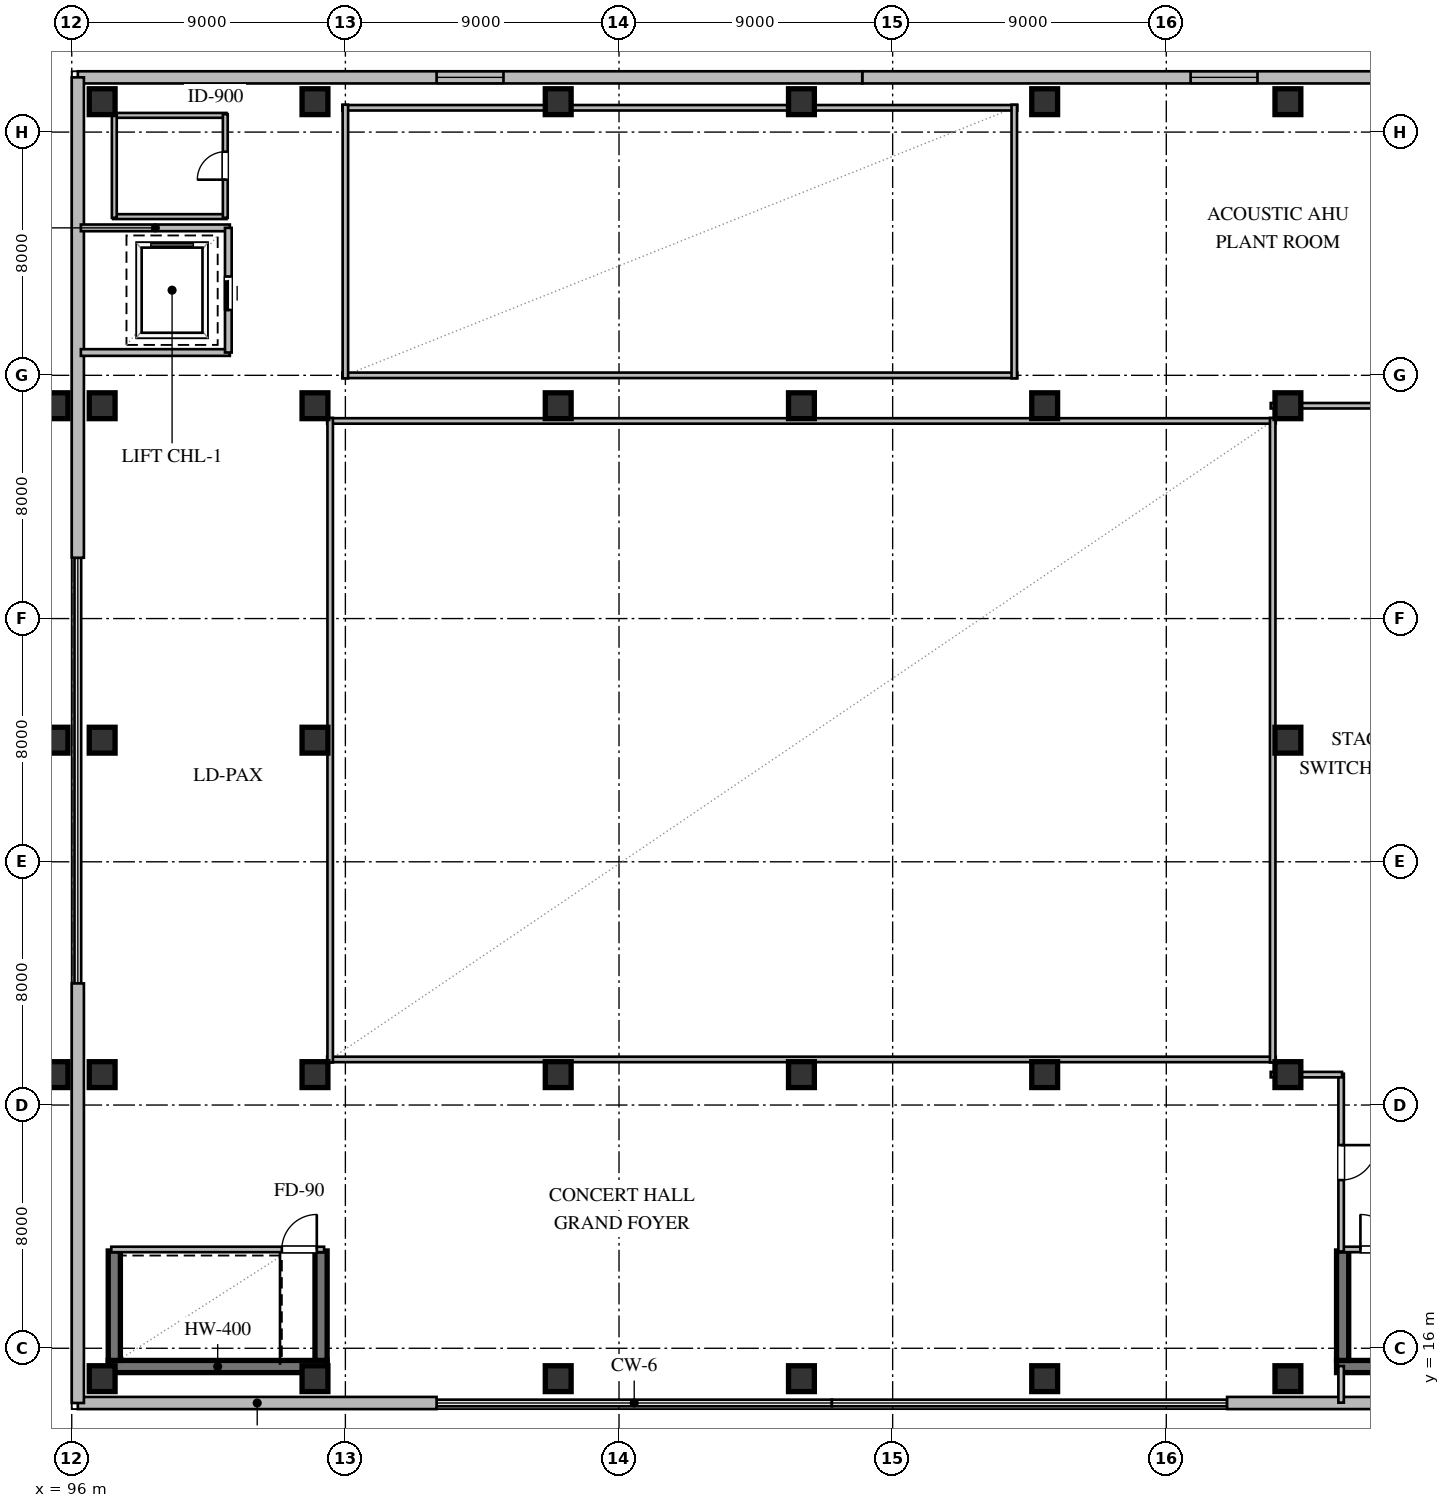
"""IFC4 building model, lengths in metres.
Left out: names, types, materials, properties, quantities, classifications, styles, units other than length and angle.
Written with IfcOpenShell. Run it as: python <this file> out.ifc"""

import sys

from ifc_helpers import new_model, si_unit, direction, frame, frame_2d, origin, origin_2d, place, context, subcontext, project, spatial, rectangle, extrude, element, fill, save


model = new_model("IFC4")
c1 = context("Model", 3, precision=1e-05, world=origin(), true_north=direction((0.0, 1.0)))
c2 = subcontext(c1, "Body", "Model", "MODEL_VIEW")
j1 = project(units=[si_unit("LENGTHUNIT", "METRE"), si_unit("PLANEANGLEUNIT", "RADIAN")], contexts=[c1])
p1 = place(None, origin())
s1 = spatial("IfcSite", under=j1, at=p1, CompositionType="ELEMENT")
p2 = place(p1, origin())
s2 = spatial("IfcBuilding", under=s1, at=p2, CompositionType="ELEMENT")
p3 = place(p2, frame((0.0, 0.0, 14.4)))
s3 = spatial("IfcBuildingStorey", under=s2, at=p3, CompositionType="ELEMENT", Elevation=14.4)
for number, where, z_axis, x_axis in (
    (1, (97.0, 15.0, 0.0), (0.0, 0.0, 1.0), (1.0, 0.0, 0.0)),
    (2, (97.0, 25.0, 0.0), (0.0, 0.0, 1.0), (1.0, 0.0, 0.0)),
    (3, (97.0, 36.0, 0.0), (0.0, 0.0, 1.0), (1.0, 0.0, 0.0)),
    (4, (97.0, 47.0, 0.0), (0.0, 0.0, 1.0), (1.0, 0.0, 0.0)),
    (5, (97.0, 57.0, 0.0), (0.0, 0.0, 1.0), (1.0, 0.0, 0.0)),
    (6, (104.0, 15.0, 0.0), (0.0, 0.0, 1.0), (1.0, 0.0, 0.0)),
    (7, (104.0, 25.0, 0.0), (0.0, 0.0, 1.0), (1.0, 0.0, 0.0)),
    (8, (104.0, 36.0, 0.0), (0.0, 0.0, 1.0), (1.0, 0.0, 0.0)),
    (9, (104.0, 47.0, 0.0), (0.0, 0.0, 1.0), (1.0, 0.0, 0.0)),
    (10, (104.0, 57.0, 0.0), (0.0, 0.0, 1.0), (1.0, 0.0, 0.0)),
    (11, (112.0, 15.0, 0.0), (0.0, 0.0, 1.0), (1.0, 0.0, 0.0)),
    (12, (112.0, 25.0, 0.0), (0.0, 0.0, 1.0), (1.0, 0.0, 0.0)),
    (13, (112.0, 47.0, 0.0), (0.0, 0.0, 1.0), (1.0, 0.0, 0.0)),
    (14, (112.0, 57.0, 0.0), (0.0, 0.0, 1.0), (1.0, 0.0, 0.0)),
    (15, (120.0, 15.0, 0.0), (0.0, 0.0, 1.0), (1.0, 0.0, 0.0)),
    (16, (120.0, 25.0, 0.0), (0.0, 0.0, 1.0), (1.0, 0.0, 0.0)),
    (17, (120.0, 47.0, 0.0), (0.0, 0.0, 1.0), (1.0, 0.0, 0.0)),
    (18, (120.0, 57.0, 0.0), (0.0, 0.0, 1.0), (1.0, 0.0, 0.0)),
    (19, (128.0, 15.0, 0.0), (0.0, 0.0, 1.0), (1.0, 0.0, 0.0)),
    (20, (128.0, 25.0, 0.0), (0.0, 0.0, 1.0), (1.0, 0.0, 0.0)),
    (21, (128.0, 47.0, 0.0), (0.0, 0.0, 1.0), (1.0, 0.0, 0.0)),
    (22, (128.0, 57.0, 0.0), (0.0, 0.0, 1.0), (1.0, 0.0, 0.0)),
    (23, (136.0, 15.0, 0.0), (0.0, 0.0, 1.0), (1.0, 0.0, 0.0)),
    (24, (136.0, 25.0, 0.0), (0.0, 0.0, 1.0), (1.0, 0.0, 0.0)),
    (25, (136.0, 36.0, 0.0), (0.0, 0.0, 1.0), (1.0, 0.0, 0.0)),
    (26, (136.0, 47.0, 0.0), (0.0, 0.0, 1.0), (1.0, 0.0, 0.0)),
    (27, (136.0, 57.0, 0.0), (0.0, 0.0, 1.0), (1.0, 0.0, 0.0)),
):
    element("IfcColumn", number, at=place(p3, frame(where, z_axis=z_axis, x_axis=x_axis)), inside=s3, PredefinedType="COLUMN", context=c2, shape_type="SweptSolid", body=[
        extrude(rectangle(XDim=0.85, YDim=0.85, at=origin_2d()), origin(), (0.0, 0.0, 1.0), 4.8),
    ])
p4 = place(p3, frame((97.2, 15.4, 0.0), z_axis=(0.0, 0.0, 1.0), x_axis=(1.0, 0.0, 0.0)))
e28 = element("IfcWall", 28, at=p4, inside=s3, PredefinedType="SHEAR", context=c2, shape_type="SweptSolid", body=[
    extrude(rectangle(XDim=7.2, YDim=0.4, at=frame_2d((3.6, 0.0))), origin(), (0.0, 0.0, 1.0), 4.52),
])
for number, where, z_axis, x_axis in (
    (29, (97.4, 15.6, 0.0), (0.0, 0.0, 1.0), (0.0, 1.0, 0.0)),
    (30, (104.2, 15.6, 0.0), (0.0, 0.0, 1.0), (0.0, 1.0, 0.0)),
):
    element("IfcWall", number, at=place(p3, frame(where, z_axis=z_axis, x_axis=x_axis)), inside=s3, PredefinedType="SHEAR", context=c2, shape_type="SweptSolid", body=[
        extrude(rectangle(XDim=3.6, YDim=0.4, at=frame_2d((1.8, 0.0))), origin(), (0.0, 0.0, 1.0), 4.52),
    ])
p5 = place(p3, frame((137.6, 15.4, 0.0), z_axis=(0.0, 0.0, 1.0), x_axis=(1.0, 0.0, 0.0)))
e31 = element("IfcWall", 31, at=p5, inside=s3, PredefinedType="SHEAR", context=c2, shape_type="SweptSolid", body=[
    extrude(rectangle(XDim=7.2, YDim=0.4, at=frame_2d((3.6, 0.0))), origin(), (0.0, 0.0, 1.0), 4.52),
])
p6 = place(p3, frame((137.8, 15.6, 0.0), z_axis=(0.0, 0.0, 1.0), x_axis=(0.0, 1.0, 0.0)))
e32 = element("IfcWall", 32, at=p6, inside=s3, PredefinedType="SHEAR", context=c2, shape_type="SweptSolid", body=[
    extrude(rectangle(XDim=3.6, YDim=0.4, at=frame_2d((1.8, 0.0))), origin(), (0.0, 0.0, 1.0), 4.52),
])
for number, where, z_axis, x_axis in (
    (33, (95.45, 25.0, 0.0), (0.0, 0.0, 1.0), (1.0, 0.0, 0.0)),
    (34, (95.45, 36.0, 0.0), (0.0, 0.0, 1.0), (1.0, 0.0, 0.0)),
    (35, (95.45, 47.0, 0.0), (0.0, 0.0, 1.0), (1.0, 0.0, 0.0)),
):
    element("IfcColumn", number, at=place(p3, frame(where, z_axis=z_axis, x_axis=x_axis)), inside=s3, PredefinedType="COLUMN", context=c2, shape_type="SweptSolid", body=[
        extrude(rectangle(XDim=0.85, YDim=0.85, at=origin_2d()), origin(), (0.0, 0.0, 1.0), 4.31),
    ])
for number, where, z_axis, x_axis in (
    (36, (96.2, 14.2, 0.0), (0.0, 0.0, 1.0), (1.0, 0.0, 0.0)),
    (37, (134.0, 14.2, 0.0), (0.0, 0.0, 1.0), (1.0, 0.0, 0.0)),
):
    element("IfcWall", number, at=place(p3, frame(where, z_axis=z_axis, x_axis=x_axis)), inside=s3, PredefinedType="STANDARD", context=c2, shape_type="SweptSolid", body=[
        extrude(rectangle(XDim=11.8, YDim=0.4, at=frame_2d((5.9, 0.0))), origin(), (0.0, 0.0, 1.0), 4.52),
    ])
p7 = place(p3, frame((145.8, 57.8, 0.0), z_axis=(0.0, 0.0, 1.0), x_axis=(-1.0, 0.0, 0.0)))
e38 = element("IfcWall", 38, at=p7, inside=s3, PredefinedType="STANDARD", context=c2, shape_type="SweptSolid", body=[
    extrude(rectangle(XDim=23.8, YDim=0.4, at=frame_2d((11.9, 0.0))), origin(), (0.0, 0.0, 1.0), 4.52),
])
p8 = place(p7, frame((10.8, 0.0, 1.25)))
e39 = element("IfcOpeningElement", 39, at=p8, cuts=e38, PredefinedType="OPENING", context=c2, shape_type="SweptSolid", body=[
    extrude(rectangle(XDim=2.2, YDim=1.5, at=frame_2d((1.1, 0.75))), frame((0.0, 0.21, 0.0), z_axis=(0.0, -1.0, 0.0), x_axis=(1.0, 0.0, 0.0)), (0.0, 0.0, 1.0), 0.42),
])
p9 = place(p3, frame((122.0, 57.8, 0.0), z_axis=(0.0, 0.0, 1.0), x_axis=(-1.0, 0.0, 0.0)))
e40 = element("IfcWall", 40, at=p9, inside=s3, PredefinedType="STANDARD", context=c2, shape_type="SweptSolid", body=[
    extrude(rectangle(XDim=25.8, YDim=0.4, at=frame_2d((12.9, 0.0))), origin(), (0.0, 0.0, 1.0), 4.52),
])
p10 = place(p9, frame((11.8, 0.0, 1.25)))
e41 = element("IfcOpeningElement", 41, at=p10, cuts=e40, PredefinedType="OPENING", context=c2, shape_type="SweptSolid", body=[
    extrude(rectangle(XDim=2.2, YDim=1.5, at=frame_2d((1.1, 0.75))), frame((0.0, 0.21, 0.0), z_axis=(0.0, -1.0, 0.0), x_axis=(1.0, 0.0, 0.0)), (0.0, 0.0, 1.0), 0.42),
])
p11 = place(p3, frame((96.2, 57.8, 0.0), z_axis=(0.0, 0.0, 1.0), x_axis=(0.0, -1.0, 0.0)))
e42 = element("IfcWall", 42, at=p11, inside=s3, PredefinedType="STANDARD", context=c2, shape_type="SweptSolid", body=[
    extrude(rectangle(XDim=15.8, YDim=0.4, at=frame_2d((7.9, 0.0))), origin(), (0.0, 0.0, 1.0), 4.52),
])
p12 = place(p3, frame((96.2, 28.0, 0.0), z_axis=(0.0, 0.0, 1.0), x_axis=(0.0, -1.0, 0.0)))
e43 = element("IfcWall", 43, at=p12, inside=s3, PredefinedType="STANDARD", context=c2, shape_type="SweptSolid", body=[
    extrude(rectangle(XDim=13.8, YDim=0.4, at=frame_2d((6.9, 0.0))), origin(), (0.0, 0.0, 1.0), 4.52),
])
p13 = place(p3, frame((97.3, 19.25, 0.0), z_axis=(0.0, 0.0, 1.0), x_axis=(1.0, 0.0, 0.0)))
e44 = element("IfcWall", 44, at=p13, inside=s3, PredefinedType="PARTITIONING", context=c2, shape_type="SweptSolid", body=[
    extrude(rectangle(XDim=7.0, YDim=0.18, at=frame_2d((3.5, 0.0))), origin(), (0.0, 0.0, 1.0), 4.52),
])
p14 = place(p13, frame((5.61, 0.0, 0.0)))
e45 = element("IfcOpeningElement", 45, at=p14, cuts=e44, PredefinedType="OPENING", context=c2, shape_type="SweptSolid", body=[
    extrude(rectangle(XDim=1.15, YDim=2.1, at=frame_2d((0.575, 1.05))), frame((0.0, 0.1, 0.0), z_axis=(0.0, -1.0, 0.0), x_axis=(1.0, 0.0, 0.0)), (0.0, 0.0, 1.0), 0.2),
])
p15 = place(p3, frame((137.7, 19.25, 0.0), z_axis=(0.0, 0.0, 1.0), x_axis=(1.0, 0.0, 0.0)))
e46 = element("IfcWall", 46, at=p15, inside=s3, PredefinedType="PARTITIONING", context=c2, shape_type="SweptSolid", body=[
    extrude(rectangle(XDim=7.0, YDim=0.18, at=frame_2d((3.5, 0.0))), origin(), (0.0, 0.0, 1.0), 4.52),
])
p16 = place(p15, frame((0.685, 0.0, 0.0)))
e47 = element("IfcOpeningElement", 47, at=p16, cuts=e46, PredefinedType="OPENING", context=c2, shape_type="SweptSolid", body=[
    extrude(rectangle(XDim=1.15, YDim=2.1, at=frame_2d((0.575, 1.05))), frame((0.0, 0.1, 0.0), z_axis=(0.0, -1.0, 0.0), x_axis=(1.0, 0.0, 0.0)), (0.0, 0.0, 1.0), 0.2),
])
for number, where, z_axis, x_axis in (
    (48, (96.3, 52.85, 0.0), (0.0, 0.0, 1.0), (1.0, 0.0, 0.0)),
    (49, (96.3, 48.75, 0.0), (0.0, 0.0, 1.0), (1.0, 0.0, 0.0)),
):
    element("IfcWall", number, at=place(p3, frame(where, z_axis=z_axis, x_axis=x_axis)), inside=s3, PredefinedType="SOLIDWALL", context=c2, shape_type="SweptSolid", body=[
        extrude(rectangle(XDim=4.9, YDim=0.22, at=frame_2d((2.45, 0.0))), origin(), (0.0, 0.0, 1.0), 4.52),
    ])
p17 = place(p3, frame((101.15, 48.75, 0.0), z_axis=(0.0, 0.0, 1.0), x_axis=(0.0, 1.0, 0.0)))
e50 = element("IfcWall", 50, at=p17, inside=s3, PredefinedType="SOLIDWALL", context=c2, shape_type="SweptSolid", body=[
    extrude(rectangle(XDim=4.1, YDim=0.22, at=frame_2d((2.05, 0.0))), origin(), (0.0, 0.0, 1.0), 4.52),
])
p18 = place(p17, frame((1.4, 0.0, 0.0)))
e51 = element("IfcOpeningElement", 51, at=p18, cuts=e50, PredefinedType="OPENING", context=c2, shape_type="SweptSolid", body=[
    extrude(rectangle(XDim=1.1, YDim=2.1, at=frame_2d((0.55, 1.05))), frame((0.0, 0.12, 0.0), z_axis=(0.0, -1.0, 0.0), x_axis=(1.0, 0.0, 0.0)), (0.0, 0.0, 1.0), 0.24),
])
p19 = place(p3, frame((97.36, 53.22, 0.0), z_axis=(0.0, 0.0, 1.0), x_axis=(1.0, 0.0, 0.0)))
e52 = element("IfcWall", 52, at=p19, inside=s3, PredefinedType="PLUMBINGWALL", context=c2, shape_type="SweptSolid", body=[
    extrude(rectangle(XDim=3.73, YDim=0.16, at=frame_2d((1.865, 0.0))), origin(), (0.0, 0.0, 1.0), 4.52),
])
p20 = place(p3, frame((97.36, 56.55, 0.0), z_axis=(0.0, 0.0, 1.0), x_axis=(1.0, 0.0, 0.0)))
e53 = element("IfcWall", 53, at=p20, inside=s3, PredefinedType="PLUMBINGWALL", context=c2, shape_type="SweptSolid", body=[
    extrude(rectangle(XDim=3.73, YDim=0.16, at=frame_2d((1.865, 0.0))), origin(), (0.0, 0.0, 1.0), 3.899),
])
p21 = place(p3, frame((97.4, 53.18, 0.0), z_axis=(0.0, 0.0, 1.0), x_axis=(0.0, 1.0, 0.0)))
e54 = element("IfcWall", 54, at=p21, inside=s3, PredefinedType="PLUMBINGWALL", context=c2, shape_type="SweptSolid", body=[
    extrude(rectangle(XDim=3.41, YDim=0.16, at=frame_2d((1.705, 0.0))), origin(), (0.0, 0.0, 1.0), 4.093),
])
p22 = place(p3, frame((101.05, 53.18, 0.0), z_axis=(0.0, 0.0, 1.0), x_axis=(0.0, 1.0, 0.0)))
e55 = element("IfcWall", 55, at=p22, inside=s3, PredefinedType="PLUMBINGWALL", context=c2, shape_type="SweptSolid", body=[
    extrude(rectangle(XDim=3.41, YDim=0.16, at=frame_2d((1.705, 0.0))), origin(), (0.0, 0.0, 1.0), 4.52),
])
p23 = place(p22, frame((1.255, 0.0, 0.0)))
e56 = element("IfcOpeningElement", 56, at=p23, cuts=e55, PredefinedType="OPENING", context=c2, shape_type="SweptSolid", body=[
    extrude(rectangle(XDim=0.92, YDim=2.1, at=frame_2d((0.46, 1.05))), frame((0.0, 0.09, 0.0), z_axis=(0.0, -1.0, 0.0), x_axis=(1.0, 0.0, 0.0)), (0.0, 0.0, 1.0), 0.18),
])
for number, where, z_axis, x_axis in (
    (57, (104.4, 25.5, 0.0), (0.0, 0.0, 1.0), (1.0, 0.0, 0.0)),
    (58, (104.4, 46.5, 0.0), (0.0, 0.0, 1.0), (1.0, 0.0, 0.0)),
):
    element("IfcWall", number, at=place(p3, frame(where, z_axis=z_axis, x_axis=x_axis)), inside=s3, PredefinedType="PARTITIONING", context=c2, shape_type="SweptSolid", body=[
        extrude(rectangle(XDim=31.2, YDim=0.18, at=frame_2d((15.6, 0.0))), origin(), (0.0, 0.0, 1.0), 3.899),
    ])
for number, where, z_axis, x_axis in (
    (59, (104.5, 25.4, 0.0), (0.0, 0.0, 1.0), (0.0, 1.0, 0.0)),
    (60, (135.5, 25.4, 0.0), (0.0, 0.0, 1.0), (0.0, 1.0, 0.0)),
):
    element("IfcWall", number, at=place(p3, frame(where, z_axis=z_axis, x_axis=x_axis)), inside=s3, PredefinedType="PARTITIONING", context=c2, shape_type="SweptSolid", body=[
        extrude(rectangle(XDim=21.2, YDim=0.18, at=frame_2d((10.6, 0.0))), origin(), (0.0, 0.0, 1.0), 4.093),
    ])
p24 = place(p3, frame((104.9, 48.0, 0.0), z_axis=(0.0, 0.0, 1.0), x_axis=(1.0, 0.0, 0.0)))
e61 = element("IfcWall", 61, at=p24, inside=s3, PredefinedType="PARTITIONING", context=c2, shape_type="SweptSolid", body=[
    extrude(rectangle(XDim=22.2, YDim=0.18, at=frame_2d((11.1, 0.0))), origin(), (0.0, 0.0, 1.0), 4.52),
])
p25 = place(p3, frame((104.9, 56.8, 0.0), z_axis=(0.0, 0.0, 1.0), x_axis=(1.0, 0.0, 0.0)))
e62 = element("IfcWall", 62, at=p25, inside=s3, PredefinedType="PARTITIONING", context=c2, shape_type="SweptSolid", body=[
    extrude(rectangle(XDim=22.2, YDim=0.18, at=frame_2d((11.1, 0.0))), origin(), (0.0, 0.0, 1.0), 3.899),
])
for number, where, z_axis, x_axis in (
    (63, (105.0, 47.9, 0.0), (0.0, 0.0, 1.0), (0.0, 1.0, 0.0)),
    (64, (127.0, 47.9, 0.0), (0.0, 0.0, 1.0), (0.0, 1.0, 0.0)),
):
    element("IfcWall", number, at=place(p3, frame(where, z_axis=z_axis, x_axis=x_axis)), inside=s3, PredefinedType="PARTITIONING", context=c2, shape_type="SweptSolid", body=[
        extrude(rectangle(XDim=9.0, YDim=0.18, at=frame_2d((4.5, 0.0))), origin(), (0.0, 0.0, 1.0), 4.52),
    ])
p26 = place(p3, frame((137.75, 25.03, 0.0), z_axis=(0.0, 0.0, 1.0), x_axis=(0.0, -1.0, 0.0)))
e65 = element("IfcWall", 65, at=p26, inside=s3, PredefinedType="PARTITIONING", context=c2, shape_type="SweptSolid", body=[
    extrude(rectangle(XDim=5.845, YDim=0.18, at=frame_2d((2.922, 0.0))), origin(), (0.0, 0.0, 1.0), 4.52),
])
p27 = place(p26, frame((2.348, 0.0, 0.0)))
e66 = element("IfcOpeningElement", 66, at=p27, cuts=e65, PredefinedType="OPENING", context=c2, shape_type="SweptSolid", body=[
    extrude(rectangle(XDim=1.15, YDim=2.1, at=frame_2d((0.575, 1.05))), frame((0.0, 0.1, 0.0), z_axis=(0.0, -1.0, 0.0), x_axis=(1.0, 0.0, 0.0)), (0.0, 0.0, 1.0), 0.2),
])
p28 = place(p3, frame((135.435, 25.0, 0.0), z_axis=(0.0, 0.0, 1.0), x_axis=(1.0, 0.0, 0.0)))
e67 = element("IfcWall", 67, at=p28, inside=s3, PredefinedType="PARTITIONING", context=c2, shape_type="SweptSolid", body=[
    extrude(rectangle(XDim=2.345, YDim=0.18, at=frame_2d((1.172, 0.0))), origin(), (0.0, 0.0, 1.0), 3.899),
])
p29 = place(p3, frame((137.75, 15.415, 0.0), z_axis=(0.0, 0.0, 1.0), x_axis=(0.0, -1.0, 0.0)))
e68 = element("IfcWall", 68, at=p29, inside=s3, PredefinedType="PARTITIONING", context=c2, shape_type="SweptSolid", body=[
    extrude(rectangle(XDim=1.205, YDim=0.18, at=frame_2d((0.603, 0.0))), origin(), (0.0, 0.0, 1.0), 4.52),
])
p30 = place(p3, frame((144.38, 47.0, 0.0), z_axis=(0.0, 0.0, 1.0), x_axis=(-1.0, 0.0, 0.0)))
e69 = element("IfcWall", 69, at=p30, inside=s3, PredefinedType="PARTITIONING", context=c2, shape_type="SweptSolid", body=[
    extrude(rectangle(XDim=8.945, YDim=0.18, at=frame_2d((4.472, 0.0))), origin(), (0.0, 0.0, 1.0), 3.899),
])
p31 = place(p30, frame((3.897, 0.0, 0.0)))
e70 = element("IfcOpeningElement", 70, at=p31, cuts=e69, PredefinedType="OPENING", context=c2, shape_type="SweptSolid", body=[
    extrude(rectangle(XDim=1.15, YDim=2.1, at=frame_2d((0.575, 1.05))), frame((0.0, 0.1, 0.0), z_axis=(0.0, -1.0, 0.0), x_axis=(1.0, 0.0, 0.0)), (0.0, 0.0, 1.0), 0.2),
])
p32 = place(p8, origin())
e71 = element("IfcWindow", 71, at=p32, inside=s3, PartitioningType="SINGLE_PANEL", PredefinedType="WINDOW", context=c2, shape_type="SweptSolid", body=[
    extrude(rectangle(XDim=2.2, YDim=1.5, at=frame_2d((1.1, 0.75))), frame((0.0, 0.03, 0.0), z_axis=(0.0, -1.0, 0.0), x_axis=(1.0, 0.0, 0.0)), (0.0, 0.0, 1.0), 0.06),
])
fill(e39, e71)
p33 = place(p10, origin())
e72 = element("IfcWindow", 72, at=p33, inside=s3, PartitioningType="SINGLE_PANEL", PredefinedType="WINDOW", context=c2, shape_type="SweptSolid", body=[
    extrude(rectangle(XDim=2.2, YDim=1.5, at=frame_2d((1.1, 0.75))), frame((0.0, 0.03, 0.0), z_axis=(0.0, -1.0, 0.0), x_axis=(1.0, 0.0, 0.0)), (0.0, 0.0, 1.0), 0.06),
])
fill(e41, e72)
p34 = place(p14, origin())
e73 = element("IfcDoor", 73, at=p34, inside=s3, OperationType="SINGLE_SWING_RIGHT", PredefinedType="DOOR", context=c2, shape_type="SweptSolid", body=[
    extrude(rectangle(XDim=1.15, YDim=2.1, at=frame_2d((0.575, 1.05))), frame((0.0, 0.025, 0.0), z_axis=(0.0, -1.0, 0.0), x_axis=(1.0, 0.0, 0.0)), (0.0, 0.0, 1.0), 0.05),
])
fill(e45, e73)
p35 = place(p16, origin())
e74 = element("IfcDoor", 74, at=p35, inside=s3, OperationType="SINGLE_SWING_LEFT", PredefinedType="DOOR", context=c2, shape_type="SweptSolid", body=[
    extrude(rectangle(XDim=1.15, YDim=2.1, at=frame_2d((0.575, 1.05))), frame((0.0, 0.025, 0.0), z_axis=(0.0, -1.0, 0.0), x_axis=(1.0, 0.0, 0.0)), (0.0, 0.0, 1.0), 0.05),
])
fill(e47, e74)
p36 = place(p18, origin())
e75 = element("IfcDoor", 75, at=p36, inside=s3, OperationType="SLIDING_TO_LEFT", PredefinedType="DOOR", context=c2, shape_type="SweptSolid", body=[
    extrude(rectangle(XDim=1.1, YDim=2.1, at=frame_2d((0.55, 1.05))), frame((0.0, 0.025, 0.0), z_axis=(0.0, -1.0, 0.0), x_axis=(1.0, 0.0, 0.0)), (0.0, 0.0, 1.0), 0.05),
])
fill(e51, e75)
p37 = place(p23, origin())
e76 = element("IfcDoor", 76, at=p37, inside=s3, OperationType="SINGLE_SWING_LEFT", PredefinedType="DOOR", context=c2, shape_type="SweptSolid", body=[
    extrude(rectangle(XDim=0.92, YDim=2.1, at=frame_2d((0.46, 1.05))), frame((0.0, 0.025, 0.0), z_axis=(0.0, -1.0, 0.0), x_axis=(1.0, 0.0, 0.0)), (0.0, 0.0, 1.0), 0.05),
])
fill(e56, e76)
p38 = place(p27, origin())
e77 = element("IfcDoor", 77, at=p38, inside=s3, OperationType="SINGLE_SWING_LEFT", PredefinedType="DOOR", context=c2, shape_type="SweptSolid", body=[
    extrude(rectangle(XDim=1.15, YDim=2.1, at=frame_2d((0.575, 1.05))), frame((0.0, 0.025, 0.0), z_axis=(0.0, -1.0, 0.0), x_axis=(1.0, 0.0, 0.0)), (0.0, 0.0, 1.0), 0.05),
])
fill(e66, e77)
save(model, sys.argv[1])
